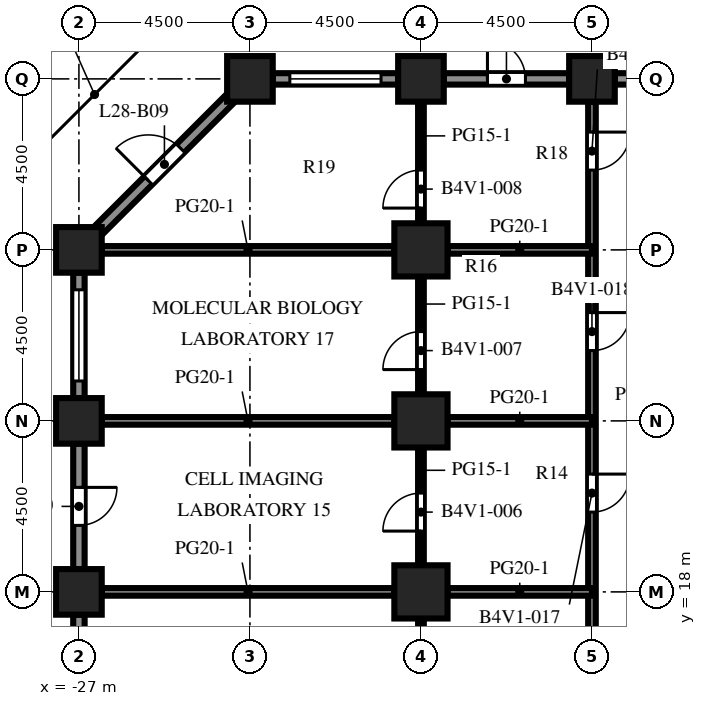
"""IFC4 building model, lengths in metres.
Left out: names, types, materials, properties, quantities, classifications, styles, units other than length and angle.
Written with IfcOpenShell. Run it as: python <this file> out.ifc"""

import sys

from ifc_helpers import new_model, si_unit, direction, frame, frame_2d, origin, origin_2d, place, context, subcontext, project, spatial, rectangle, extrude, element, fill, save


model = new_model("IFC4")
c1 = context("Model", 3, precision=1e-05, world=origin(), true_north=direction((0.0, 1.0)))
c2 = subcontext(c1, "Body", "Model", "MODEL_VIEW")
j1 = project(units=[si_unit("LENGTHUNIT", "METRE"), si_unit("PLANEANGLEUNIT", "RADIAN")], contexts=[c1])
p1 = place(None, origin())
s1 = spatial("IfcSite", under=j1, at=p1, CompositionType="ELEMENT")
p2 = place(p1, origin())
s2 = spatial("IfcBuilding", under=s1, at=p2, CompositionType="ELEMENT")
p3 = place(p2, frame((0.0, 0.0, 124.9)))
s3 = spatial("IfcBuildingStorey", under=s2, at=p3, CompositionType="ELEMENT", Elevation=124.9)
for number, where, z_axis, x_axis in (
    (1, (-27.0, 18.0, 0.0), (0.0, 0.0, 1.0), (1.0, 0.0, 0.0)),
    (2, (-27.0, 22.5, 0.0), (0.0, 0.0, 1.0), (1.0, 0.0, 0.0)),
    (3, (-27.0, 27.0, 0.0), (0.0, 0.0, 1.0), (1.0, 0.0, 0.0)),
    (4, (-22.5, 31.5, 0.0), (0.0, 0.0, 1.0), (1.0, 0.0, 0.0)),
    (5, (-18.0, 31.5, 0.0), (0.0, 0.0, 1.0), (1.0, 0.0, 0.0)),
    (6, (-13.5, 31.5, 0.0), (0.0, 0.0, 1.0), (1.0, 0.0, 0.0)),
):
    element("IfcColumn", number, at=place(p3, frame(where, z_axis=z_axis, x_axis=x_axis)), inside=s3, PredefinedType="COLUMN", context=c2, shape_type="SweptSolid", body=[
        extrude(rectangle(XDim=1.2, YDim=1.2, at=origin_2d()), origin(), (0.0, 0.0, 1.0), 4.1),
    ])
for number, where, z_axis, x_axis in (
    (7, (-18.0, 18.0, 0.0), (0.0, 0.0, 1.0), (1.0, 0.0, 0.0)),
    (8, (-18.0, 22.5, 0.0), (0.0, 0.0, 1.0), (1.0, 0.0, 0.0)),
    (9, (-18.0, 27.0, 0.0), (0.0, 0.0, 1.0), (1.0, 0.0, 0.0)),
):
    element("IfcColumn", number, at=place(p3, frame(where, z_axis=z_axis, x_axis=x_axis)), inside=s3, PredefinedType="COLUMN", context=c2, shape_type="SweptSolid", body=[
        extrude(rectangle(XDim=1.4, YDim=1.4, at=origin_2d()), origin(), (0.0, 0.0, 1.0), 4.1),
    ])
p4 = place(p3, frame((-12.9, 31.5, 0.0), z_axis=(0.0, 0.0, 1.0), x_axis=(1.0, 0.0, 0.0)))
e10 = element("IfcWall", 10, at=p4, inside=s3, PredefinedType="SOLIDWALL", context=c2, shape_type="SweptSolid", body=[
    extrude(rectangle(XDim=3.3, YDim=0.3, at=frame_2d((1.65, 0.0))), origin(), (0.0, 0.0, 1.0), 2.75),
])
p5 = place(p4, frame((0.525, 0.0, 0.8)))
e11 = element("IfcOpeningElement", 11, at=p5, cuts=e10, PredefinedType="OPENING", context=c2, shape_type="SweptSolid", body=[
    extrude(rectangle(XDim=1.2, YDim=1.7, at=frame_2d((0.6, 0.85))), frame((0.0, 0.16, 0.0), z_axis=(0.0, -1.0, 0.0), x_axis=(1.0, 0.0, 0.0)), (0.0, 0.0, 1.0), 0.32),
])
p6 = place(p3, frame((-17.4, 31.5, 0.0), z_axis=(0.0, 0.0, 1.0), x_axis=(1.0, 0.0, 0.0)))
e12 = element("IfcWall", 12, at=p6, inside=s3, PredefinedType="SOLIDWALL", context=c2, shape_type="SweptSolid", body=[
    extrude(rectangle(XDim=3.3, YDim=0.3, at=frame_2d((1.65, 0.0))), origin(), (0.0, 0.0, 1.0), 2.75),
])
p7 = place(p6, frame((1.15, 0.0, 0.0)))
e13 = element("IfcOpeningElement", 13, at=p7, cuts=e12, PredefinedType="OPENING", context=c2, shape_type="SweptSolid", body=[
    extrude(rectangle(XDim=1.0, YDim=2.2, at=frame_2d((0.5, 1.1))), frame((0.0, 0.16, 0.0), z_axis=(0.0, -1.0, 0.0), x_axis=(1.0, 0.0, 0.0)), (0.0, 0.0, 1.0), 0.32),
])
p8 = place(p3, frame((-21.9, 31.5, 0.0), z_axis=(0.0, 0.0, 1.0), x_axis=(1.0, 0.0, 0.0)))
e14 = element("IfcWall", 14, at=p8, inside=s3, PredefinedType="SOLIDWALL", context=c2, shape_type="SweptSolid", body=[
    extrude(rectangle(XDim=3.3, YDim=0.3, at=frame_2d((1.65, 0.0))), origin(), (0.0, 0.0, 1.0), 2.75),
])
p9 = place(p8, frame((0.45, 0.0, 0.8)))
e15 = element("IfcOpeningElement", 15, at=p9, cuts=e14, PredefinedType="OPENING", context=c2, shape_type="SweptSolid", body=[
    extrude(rectangle(XDim=2.4, YDim=1.7, at=frame_2d((1.2, 0.85))), frame((0.0, 0.16, 0.0), z_axis=(0.0, -1.0, 0.0), x_axis=(1.0, 0.0, 0.0)), (0.0, 0.0, 1.0), 0.32),
])
p10 = place(p3, frame((-26.506, 27.494, 0.0), z_axis=(0.0, 0.0, 1.0), x_axis=(0.707106781187, 0.707106781187, 0.0)))
e16 = element("IfcWall", 16, at=p10, inside=s3, PredefinedType="SOLIDWALL", context=c2, shape_type="SweptSolid", body=[
    extrude(rectangle(XDim=4.967, YDim=0.3, at=frame_2d((2.483, 0.0))), origin(), (0.0, 0.0, 1.0), 2.75),
])
p11 = place(p10, frame((1.884, 0.0, 0.0)))
e17 = element("IfcOpeningElement", 17, at=p11, cuts=e16, PredefinedType="OPENING", context=c2, shape_type="SweptSolid", body=[
    extrude(rectangle(XDim=1.2, YDim=2.2, at=frame_2d((0.6, 1.1))), frame((0.0, 0.16, 0.0), z_axis=(0.0, -1.0, 0.0), x_axis=(1.0, 0.0, 0.0)), (0.0, 0.0, 1.0), 0.32),
])
p12 = place(p3, frame((-27.0, 23.1, 0.0), z_axis=(0.0, 0.0, 1.0), x_axis=(0.0, 1.0, 0.0)))
e18 = element("IfcWall", 18, at=p12, inside=s3, PredefinedType="SOLIDWALL", context=c2, shape_type="SweptSolid", body=[
    extrude(rectangle(XDim=3.3, YDim=0.3, at=frame_2d((1.65, 0.0))), origin(), (0.0, 0.0, 1.0), 2.75),
])
p13 = place(p12, frame((0.45, 0.0, 0.8)))
e19 = element("IfcOpeningElement", 19, at=p13, cuts=e18, PredefinedType="OPENING", context=c2, shape_type="SweptSolid", body=[
    extrude(rectangle(XDim=2.4, YDim=1.7, at=frame_2d((1.2, 0.85))), frame((0.0, 0.16, 0.0), z_axis=(0.0, -1.0, 0.0), x_axis=(1.0, 0.0, 0.0)), (0.0, 0.0, 1.0), 0.32),
])
p14 = place(p3, frame((-27.0, 18.6, 0.0), z_axis=(0.0, 0.0, 1.0), x_axis=(0.0, 1.0, 0.0)))
e20 = element("IfcWall", 20, at=p14, inside=s3, PredefinedType="SOLIDWALL", context=c2, shape_type="SweptSolid", body=[
    extrude(rectangle(XDim=3.3, YDim=0.3, at=frame_2d((1.65, 0.0))), origin(), (0.0, 0.0, 1.0), 2.75),
])
p15 = place(p14, frame((1.15, 0.0, 0.0)))
e21 = element("IfcOpeningElement", 21, at=p15, cuts=e20, PredefinedType="OPENING", context=c2, shape_type="SweptSolid", body=[
    extrude(rectangle(XDim=1.0, YDim=2.2, at=frame_2d((0.5, 1.1))), frame((0.0, 0.16, 0.0), z_axis=(0.0, -1.0, 0.0), x_axis=(1.0, 0.0, 0.0)), (0.0, 0.0, 1.0), 0.32),
])
p16 = place(p3, frame((-27.0, 14.1, 0.0), z_axis=(0.0, 0.0, 1.0), x_axis=(0.0, 1.0, 0.0)))
e22 = element("IfcWall", 22, at=p16, inside=s3, PredefinedType="SOLIDWALL", context=c2, shape_type="SweptSolid", body=[
    extrude(rectangle(XDim=3.3, YDim=0.3, at=frame_2d((1.65, 0.0))), origin(), (0.0, 0.0, 1.0), 2.75),
])
p17 = place(p16, frame((0.45, 0.0, 0.8)))
e23 = element("IfcOpeningElement", 23, at=p17, cuts=e22, PredefinedType="OPENING", context=c2, shape_type="SweptSolid", body=[
    extrude(rectangle(XDim=2.4, YDim=1.7, at=frame_2d((1.2, 0.85))), frame((0.0, 0.16, 0.0), z_axis=(0.0, -1.0, 0.0), x_axis=(1.0, 0.0, 0.0)), (0.0, 0.0, 1.0), 0.32),
])
p18 = place(p3, frame((-18.0, 9.7, 0.0), z_axis=(0.0, 0.0, 1.0), x_axis=(0.0, 1.0, 0.0)))
e24 = element("IfcWall", 24, at=p18, inside=s3, PredefinedType="PARTITIONING", context=c2, shape_type="SweptSolid", body=[
    extrude(rectangle(XDim=7.6, YDim=0.15, at=frame_2d((3.8, 0.0))), origin(), (0.0, 0.0, 1.0), 3.65),
])
p19 = place(p18, frame((2.15, 0.0, 0.0)))
e25 = element("IfcOpeningElement", 25, at=p19, cuts=e24, PredefinedType="OPENING", context=c2, shape_type="SweptSolid", body=[
    extrude(rectangle(XDim=1.0, YDim=2.1, at=frame_2d((0.5, 1.05))), frame((0.0, 0.085, 0.0), z_axis=(0.0, -1.0, 0.0), x_axis=(1.0, 0.0, 0.0)), (0.0, 0.0, 1.0), 0.17),
])
p20 = place(p3, frame((-18.0, 18.7, 0.0), z_axis=(0.0, 0.0, 1.0), x_axis=(0.0, 1.0, 0.0)))
e26 = element("IfcWall", 26, at=p20, inside=s3, PredefinedType="PARTITIONING", context=c2, shape_type="SweptSolid", body=[
    extrude(rectangle(XDim=3.1, YDim=0.15, at=frame_2d((1.55, 0.0))), origin(), (0.0, 0.0, 1.0), 3.65),
])
p21 = place(p20, frame((0.9, 0.0, 0.0)))
e27 = element("IfcOpeningElement", 27, at=p21, cuts=e26, PredefinedType="OPENING", context=c2, shape_type="SweptSolid", body=[
    extrude(rectangle(XDim=1.0, YDim=2.1, at=frame_2d((0.5, 1.05))), frame((0.0, 0.085, 0.0), z_axis=(0.0, -1.0, 0.0), x_axis=(1.0, 0.0, 0.0)), (0.0, 0.0, 1.0), 0.17),
])
p22 = place(p3, frame((-18.0, 23.2, 0.0), z_axis=(0.0, 0.0, 1.0), x_axis=(0.0, 1.0, 0.0)))
e28 = element("IfcWall", 28, at=p22, inside=s3, PredefinedType="PARTITIONING", context=c2, shape_type="SweptSolid", body=[
    extrude(rectangle(XDim=3.1, YDim=0.15, at=frame_2d((1.55, 0.0))), origin(), (0.0, 0.0, 1.0), 3.65),
])
p23 = place(p22, frame((0.65, 0.0, 0.0)))
e29 = element("IfcOpeningElement", 29, at=p23, cuts=e28, PredefinedType="OPENING", context=c2, shape_type="SweptSolid", body=[
    extrude(rectangle(XDim=1.0, YDim=2.1, at=frame_2d((0.5, 1.05))), frame((0.0, 0.085, 0.0), z_axis=(0.0, -1.0, 0.0), x_axis=(1.0, 0.0, 0.0)), (0.0, 0.0, 1.0), 0.17),
])
p24 = place(p3, frame((-18.0, 27.7, 0.0), z_axis=(0.0, 0.0, 1.0), x_axis=(0.0, 1.0, 0.0)))
e30 = element("IfcWall", 30, at=p24, inside=s3, PredefinedType="PARTITIONING", context=c2, shape_type="SweptSolid", body=[
    extrude(rectangle(XDim=3.2, YDim=0.15, at=frame_2d((1.6, 0.0))), origin(), (0.0, 0.0, 1.0), 3.65),
])
p25 = place(p24, frame((0.4, 0.0, 0.0)))
e31 = element("IfcOpeningElement", 31, at=p25, cuts=e30, PredefinedType="OPENING", context=c2, shape_type="SweptSolid", body=[
    extrude(rectangle(XDim=1.0, YDim=2.1, at=frame_2d((0.5, 1.05))), frame((0.0, 0.085, 0.0), z_axis=(0.0, -1.0, 0.0), x_axis=(1.0, 0.0, 0.0)), (0.0, 0.0, 1.0), 0.17),
])
p26 = place(p3, frame((-13.5, -21.9, 0.0), z_axis=(0.0, 0.0, 1.0), x_axis=(0.0, 1.0, 0.0)))
e32 = element("IfcWall", 32, at=p26, inside=s3, PredefinedType="PARTITIONING", context=c2, shape_type="SweptSolid", body=[
    extrude(rectangle(XDim=52.8, YDim=0.2, at=frame_2d((26.4, 0.0))), origin(), (0.0, 0.0, 1.0), 3.65),
])
p27 = place(p26, frame((3.25, 0.0, 0.0)))
e33 = element("IfcOpeningElement", 33, at=p27, cuts=e32, PredefinedType="OPENING", context=c2, shape_type="SweptSolid", body=[
    extrude(rectangle(XDim=1.0, YDim=2.1, at=frame_2d((0.5, 1.05))), frame((0.0, 0.11, 0.0), z_axis=(0.0, -1.0, 0.0), x_axis=(1.0, 0.0, 0.0)), (0.0, 0.0, 1.0), 0.22),
])
p28 = place(p26, frame((10.0, 0.0, 0.0)))
e34 = element("IfcOpeningElement", 34, at=p28, cuts=e32, PredefinedType="OPENING", context=c2, shape_type="SweptSolid", body=[
    extrude(rectangle(XDim=1.0, YDim=2.1, at=frame_2d((0.5, 1.05))), frame((0.0, 0.11, 0.0), z_axis=(0.0, -1.0, 0.0), x_axis=(1.0, 0.0, 0.0)), (0.0, 0.0, 1.0), 0.22),
])
p29 = place(p26, frame((21.0, 0.0, 0.0)))
e35 = element("IfcOpeningElement", 35, at=p29, cuts=e32, PredefinedType="OPENING", context=c2, shape_type="SweptSolid", body=[
    extrude(rectangle(XDim=1.0, YDim=2.1, at=frame_2d((0.5, 1.05))), frame((0.0, 0.11, 0.0), z_axis=(0.0, -1.0, 0.0), x_axis=(1.0, 0.0, 0.0)), (0.0, 0.0, 1.0), 0.22),
])
p30 = place(p26, frame((27.75, 0.0, 0.0)))
e36 = element("IfcOpeningElement", 36, at=p30, cuts=e32, PredefinedType="OPENING", context=c2, shape_type="SweptSolid", body=[
    extrude(rectangle(XDim=1.0, YDim=2.1, at=frame_2d((0.5, 1.05))), frame((0.0, 0.11, 0.0), z_axis=(0.0, -1.0, 0.0), x_axis=(1.0, 0.0, 0.0)), (0.0, 0.0, 1.0), 0.22),
])
p31 = place(p26, frame((34.75, 0.0, 0.0)))
e37 = element("IfcOpeningElement", 37, at=p31, cuts=e32, PredefinedType="OPENING", context=c2, shape_type="SweptSolid", body=[
    extrude(rectangle(XDim=1.0, YDim=2.1, at=frame_2d((0.5, 1.05))), frame((0.0, 0.11, 0.0), z_axis=(0.0, -1.0, 0.0), x_axis=(1.0, 0.0, 0.0)), (0.0, 0.0, 1.0), 0.22),
])
p32 = place(p26, frame((42.0, 0.0, 0.0)))
e38 = element("IfcOpeningElement", 38, at=p32, cuts=e32, PredefinedType="OPENING", context=c2, shape_type="SweptSolid", body=[
    extrude(rectangle(XDim=1.0, YDim=2.1, at=frame_2d((0.5, 1.05))), frame((0.0, 0.11, 0.0), z_axis=(0.0, -1.0, 0.0), x_axis=(1.0, 0.0, 0.0)), (0.0, 0.0, 1.0), 0.22),
])
p33 = place(p26, frame((46.25, 0.0, 0.0)))
e39 = element("IfcOpeningElement", 39, at=p33, cuts=e32, PredefinedType="OPENING", context=c2, shape_type="SweptSolid", body=[
    extrude(rectangle(XDim=1.0, YDim=2.1, at=frame_2d((0.5, 1.05))), frame((0.0, 0.11, 0.0), z_axis=(0.0, -1.0, 0.0), x_axis=(1.0, 0.0, 0.0)), (0.0, 0.0, 1.0), 0.22),
])
p34 = place(p26, frame((51.0, 0.0, 0.0)))
e40 = element("IfcOpeningElement", 40, at=p34, cuts=e32, PredefinedType="OPENING", context=c2, shape_type="SweptSolid", body=[
    extrude(rectangle(XDim=1.0, YDim=2.1, at=frame_2d((0.5, 1.05))), frame((0.0, 0.11, 0.0), z_axis=(0.0, -1.0, 0.0), x_axis=(1.0, 0.0, 0.0)), (0.0, 0.0, 1.0), 0.22),
])
p35 = place(p3, frame((-26.4, 18.0, 0.0), z_axis=(0.0, 0.0, 1.0), x_axis=(1.0, 0.0, 0.0)))
e41 = element("IfcWall", 41, at=p35, inside=s3, PredefinedType="PARTITIONING", context=c2, shape_type="SweptSolid", body=[
    extrude(rectangle(XDim=7.7, YDim=0.2, at=frame_2d((3.85, 0.0))), origin(), (0.0, 0.0, 1.0), 3.65),
])
p36 = place(p3, frame((-17.3, 18.0, 0.0), z_axis=(0.0, 0.0, 1.0), x_axis=(1.0, 0.0, 0.0)))
e42 = element("IfcWall", 42, at=p36, inside=s3, PredefinedType="PARTITIONING", context=c2, shape_type="SweptSolid", body=[
    extrude(rectangle(XDim=3.8, YDim=0.2, at=frame_2d((1.9, 0.0))), origin(), (0.0, 0.0, 1.0), 3.65),
])
p37 = place(p3, frame((-26.4, 22.5, 0.0), z_axis=(0.0, 0.0, 1.0), x_axis=(1.0, 0.0, 0.0)))
e43 = element("IfcWall", 43, at=p37, inside=s3, PredefinedType="PARTITIONING", context=c2, shape_type="SweptSolid", body=[
    extrude(rectangle(XDim=7.7, YDim=0.2, at=frame_2d((3.85, 0.0))), origin(), (0.0, 0.0, 1.0), 3.65),
])
p38 = place(p3, frame((-17.3, 22.5, 0.0), z_axis=(0.0, 0.0, 1.0), x_axis=(1.0, 0.0, 0.0)))
e44 = element("IfcWall", 44, at=p38, inside=s3, PredefinedType="PARTITIONING", context=c2, shape_type="SweptSolid", body=[
    extrude(rectangle(XDim=3.8, YDim=0.2, at=frame_2d((1.9, 0.0))), origin(), (0.0, 0.0, 1.0), 3.65),
])
p39 = place(p3, frame((-26.4, 27.0, 0.0), z_axis=(0.0, 0.0, 1.0), x_axis=(1.0, 0.0, 0.0)))
e45 = element("IfcWall", 45, at=p39, inside=s3, PredefinedType="PARTITIONING", context=c2, shape_type="SweptSolid", body=[
    extrude(rectangle(XDim=7.7, YDim=0.2, at=frame_2d((3.85, 0.0))), origin(), (0.0, 0.0, 1.0), 3.65),
])
p40 = place(p3, frame((-17.3, 27.0, 0.0), z_axis=(0.0, 0.0, 1.0), x_axis=(1.0, 0.0, 0.0)))
e46 = element("IfcWall", 46, at=p40, inside=s3, PredefinedType="PARTITIONING", context=c2, shape_type="SweptSolid", body=[
    extrude(rectangle(XDim=3.8, YDim=0.2, at=frame_2d((1.9, 0.0))), origin(), (0.0, 0.0, 1.0), 3.65),
])
p41 = place(p7, origin())
e47 = element("IfcDoor", 47, at=p41, inside=s3, OperationType="SINGLE_SWING_LEFT", PredefinedType="DOOR", context=c2, shape_type="SweptSolid", body=[
    extrude(rectangle(XDim=1.0, YDim=2.2, at=frame_2d((0.5, 1.1))), frame((0.0, 0.025, 0.0), z_axis=(0.0, -1.0, 0.0), x_axis=(1.0, 0.0, 0.0)), (0.0, 0.0, 1.0), 0.05),
])
fill(e13, e47)
p42 = place(p9, origin())
e48 = element("IfcWindow", 48, at=p42, inside=s3, PartitioningType="SINGLE_PANEL", PredefinedType="WINDOW", context=c2, shape_type="SweptSolid", body=[
    extrude(rectangle(XDim=2.4, YDim=1.7, at=frame_2d((1.2, 0.85))), frame((0.0, 0.03, 0.0), z_axis=(0.0, -1.0, 0.0), x_axis=(1.0, 0.0, 0.0)), (0.0, 0.0, 1.0), 0.06),
])
fill(e15, e48)
p43 = place(p11, origin())
e49 = element("IfcDoor", 49, at=p43, inside=s3, OperationType="SINGLE_SWING_LEFT", PredefinedType="DOOR", context=c2, shape_type="SweptSolid", body=[
    extrude(rectangle(XDim=1.2, YDim=2.2, at=frame_2d((0.6, 1.1))), frame((0.0, 0.025, 0.0), z_axis=(0.0, -1.0, 0.0), x_axis=(1.0, 0.0, 0.0)), (0.0, 0.0, 1.0), 0.05),
])
fill(e17, e49)
p44 = place(p13, origin())
e50 = element("IfcWindow", 50, at=p44, inside=s3, PartitioningType="SINGLE_PANEL", PredefinedType="WINDOW", context=c2, shape_type="SweptSolid", body=[
    extrude(rectangle(XDim=2.4, YDim=1.7, at=frame_2d((1.2, 0.85))), frame((0.0, 0.03, 0.0), z_axis=(0.0, -1.0, 0.0), x_axis=(1.0, 0.0, 0.0)), (0.0, 0.0, 1.0), 0.06),
])
fill(e19, e50)
p45 = place(p15, origin())
e51 = element("IfcDoor", 51, at=p45, inside=s3, OperationType="SINGLE_SWING_RIGHT", PredefinedType="DOOR", context=c2, shape_type="SweptSolid", body=[
    extrude(rectangle(XDim=1.0, YDim=2.2, at=frame_2d((0.5, 1.1))), frame((0.0, 0.025, 0.0), z_axis=(0.0, -1.0, 0.0), x_axis=(1.0, 0.0, 0.0)), (0.0, 0.0, 1.0), 0.05),
])
fill(e21, e51)
p46 = place(p21, origin())
e52 = element("IfcDoor", 52, at=p46, inside=s3, OperationType="SINGLE_SWING_LEFT", PredefinedType="DOOR", context=c2, shape_type="SweptSolid", body=[
    extrude(rectangle(XDim=1.0, YDim=2.1, at=frame_2d((0.5, 1.05))), frame((0.0, 0.025, 0.0), z_axis=(0.0, -1.0, 0.0), x_axis=(1.0, 0.0, 0.0)), (0.0, 0.0, 1.0), 0.05),
])
fill(e27, e52)
p47 = place(p23, origin())
e53 = element("IfcDoor", 53, at=p47, inside=s3, OperationType="SINGLE_SWING_LEFT", PredefinedType="DOOR", context=c2, shape_type="SweptSolid", body=[
    extrude(rectangle(XDim=1.0, YDim=2.1, at=frame_2d((0.5, 1.05))), frame((0.0, 0.025, 0.0), z_axis=(0.0, -1.0, 0.0), x_axis=(1.0, 0.0, 0.0)), (0.0, 0.0, 1.0), 0.05),
])
fill(e29, e53)
p48 = place(p25, origin())
e54 = element("IfcDoor", 54, at=p48, inside=s3, OperationType="SINGLE_SWING_LEFT", PredefinedType="DOOR", context=c2, shape_type="SweptSolid", body=[
    extrude(rectangle(XDim=1.0, YDim=2.1, at=frame_2d((0.5, 1.05))), frame((0.0, 0.025, 0.0), z_axis=(0.0, -1.0, 0.0), x_axis=(1.0, 0.0, 0.0)), (0.0, 0.0, 1.0), 0.05),
])
fill(e31, e54)
p49 = place(p32, origin())
e55 = element("IfcDoor", 55, at=p49, inside=s3, OperationType="SINGLE_SWING_RIGHT", PredefinedType="DOOR", context=c2, shape_type="SweptSolid", body=[
    extrude(rectangle(XDim=1.0, YDim=2.1, at=frame_2d((0.5, 1.05))), frame((0.0, 0.025, 0.0), z_axis=(0.0, -1.0, 0.0), x_axis=(1.0, 0.0, 0.0)), (0.0, 0.0, 1.0), 0.05),
])
fill(e38, e55)
p50 = place(p33, origin())
e56 = element("IfcDoor", 56, at=p50, inside=s3, OperationType="SINGLE_SWING_RIGHT", PredefinedType="DOOR", context=c2, shape_type="SweptSolid", body=[
    extrude(rectangle(XDim=1.0, YDim=2.1, at=frame_2d((0.5, 1.05))), frame((0.0, 0.025, 0.0), z_axis=(0.0, -1.0, 0.0), x_axis=(1.0, 0.0, 0.0)), (0.0, 0.0, 1.0), 0.05),
])
fill(e39, e56)
p51 = place(p34, origin())
e57 = element("IfcDoor", 57, at=p51, inside=s3, OperationType="SINGLE_SWING_RIGHT", PredefinedType="DOOR", context=c2, shape_type="SweptSolid", body=[
    extrude(rectangle(XDim=1.0, YDim=2.1, at=frame_2d((0.5, 1.05))), frame((0.0, 0.025, 0.0), z_axis=(0.0, -1.0, 0.0), x_axis=(1.0, 0.0, 0.0)), (0.0, 0.0, 1.0), 0.05),
])
fill(e40, e57)
save(model, sys.argv[1])
